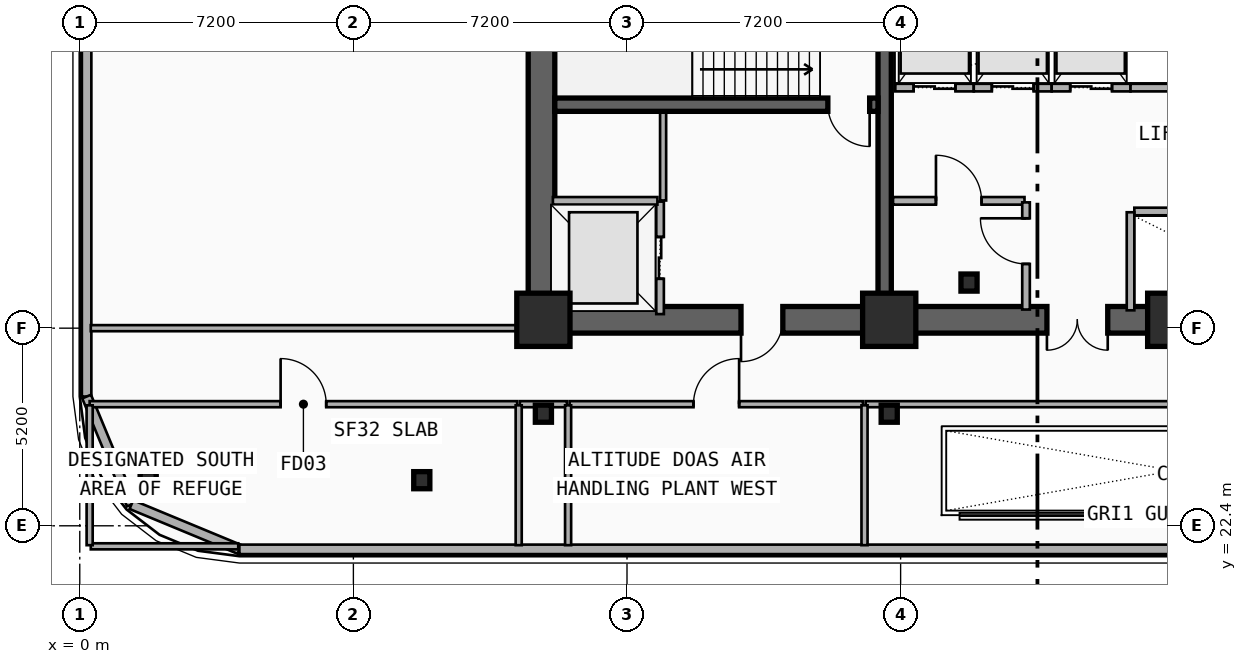
"""IFC4 building model, lengths in metres.
Left out: names, types, materials, properties, quantities, classifications, styles, units other than length and angle.
Written with IfcOpenShell. Run it as: python <this file> out.ifc"""

import sys

from ifc_helpers import new_model, si_unit, direction, frame, frame_2d, origin, origin_2d, place, context, subcontext, project, spatial, rectangle, i_section, extrude, element, fill, save


model = new_model("IFC4")
c1 = context("Model", 3, precision=1e-05, world=origin(), true_north=direction((0.0, 1.0)))
c2 = subcontext(c1, "Body", "Model", "MODEL_VIEW")
j1 = project(units=[si_unit("LENGTHUNIT", "METRE"), si_unit("PLANEANGLEUNIT", "RADIAN")], contexts=[c1])
p1 = place(None, origin())
s1 = spatial("IfcSite", under=j1, at=p1, CompositionType="ELEMENT")
p2 = place(p1, origin())
s2 = spatial("IfcBuilding", under=s1, at=p2, CompositionType="ELEMENT")
p3 = place(p2, frame((0.0, 0.0, 74.5)))
s3 = spatial("IfcBuildingStorey", under=s2, at=p3, CompositionType="ELEMENT", Elevation=74.5)
p4 = place(p3, frame((21.18, 27.82, 0.0), z_axis=(0.0, 0.0, 1.0), x_axis=(-1.0, 0.0, 0.0)))
e1 = element("IfcWall", 1, at=p4, inside=s3, PredefinedType="SHEAR", context=c2, shape_type="SweptSolid", body=[
    extrude(rectangle(XDim=9.03, YDim=0.7, at=frame_2d((4.515, 0.0))), origin(), (0.0, 0.0, 1.0), 4.8),
])
p5 = place(p4, frame((2.68, 0.0, 0.0)))
e2 = element("IfcOpeningElement", 2, at=p5, cuts=e1, PredefinedType="OPENING", context=c2, shape_type="SweptSolid", body=[
    extrude(rectangle(XDim=1.1, YDim=2.15, at=frame_2d((0.55, 1.075))), frame((0.0, 0.36, 0.0), z_axis=(0.0, -1.0, 0.0), x_axis=(1.0, 0.0, 0.0)), (0.0, 0.0, 1.0), 0.72),
])
p6 = place(p3, frame((33.15, 27.82, 0.0), z_axis=(0.0, 0.0, 1.0), x_axis=(-1.0, 0.0, 0.0)))
e3 = element("IfcWall", 3, at=p6, inside=s3, PredefinedType="SHEAR", context=c2, shape_type="SweptSolid", body=[
    extrude(rectangle(XDim=11.97, YDim=0.7, at=frame_2d((5.985, 0.0))), origin(), (0.0, 0.0, 1.0), 4.8),
])
p7 = place(p6, frame((6.1, 0.0, 0.0)))
e4 = element("IfcOpeningElement", 4, at=p7, cuts=e3, PredefinedType="OPENING", context=c2, shape_type="SweptSolid", body=[
    extrude(rectangle(XDim=1.6, YDim=2.2, at=frame_2d((0.8, 1.1))), frame((0.0, 0.36, 0.0), z_axis=(0.0, -1.0, 0.0), x_axis=(1.0, 0.0, 0.0)), (0.0, 0.0, 1.0), 0.72),
])
p8 = place(p3, frame((12.15, 28.17, 0.0), z_axis=(0.0, 0.0, 1.0), x_axis=(0.0, 1.0, 0.0)))
e5 = element("IfcWall", 5, at=p8, inside=s3, PredefinedType="SHEAR", context=c2, shape_type="SweptSolid", body=[
    extrude(rectangle(XDim=8.53, YDim=0.7, at=frame_2d((4.265, 0.0))), origin(), (0.0, 0.0, 1.0), 4.8),
])
p9 = place(p3, frame((21.18, 28.17, 0.0), z_axis=(0.0, 0.0, 1.0), x_axis=(0.0, 1.0, 0.0)))
e6 = element("IfcWall", 6, at=p9, inside=s3, PredefinedType="SHEAR", context=c2, shape_type="SweptSolid", body=[
    extrude(rectangle(XDim=8.53, YDim=0.35, at=frame_2d((4.265, 0.0))), origin(), (0.0, 0.0, 1.0), 4.8),
])
p10 = place(p3, frame((21.005, 33.48, 0.0), z_axis=(0.0, 0.0, 1.0), x_axis=(-1.0, 0.0, 0.0)))
e7 = element("IfcWall", 7, at=p10, inside=s3, PredefinedType="SHEAR", context=c2, shape_type="SweptSolid", body=[
    extrude(rectangle(XDim=8.505, YDim=0.35, at=frame_2d((4.252, 0.0))), origin(), (0.0, 0.0, 1.0), 4.8),
])
p11 = place(p10, frame((0.22, 0.0, 0.0)))
e8 = element("IfcOpeningElement", 8, at=p11, cuts=e7, PredefinedType="OPENING", context=c2, shape_type="SweptSolid", body=[
    extrude(rectangle(XDim=1.1, YDim=2.15, at=frame_2d((0.55, 1.075))), frame((0.0, 0.185, 0.0), z_axis=(0.0, -1.0, 0.0), x_axis=(1.0, 0.0, 0.0)), (0.0, 0.0, 1.0), 0.37),
])
p12 = place(p3, frame((23.4, 28.8, 0.0), z_axis=(0.0, 0.0, 1.0), x_axis=(1.0, 0.0, 0.0)))
e9 = element("IfcColumn", 9, at=p12, inside=s3, PredefinedType="COLUMN", context=c2, shape_type="SweptSolid", body=[
    extrude(i_section(OverallWidth=0.424, OverallDepth=0.45, WebThickness=0.041, FlangeThickness=0.065, FilletRadius=0.015, at=origin_2d()), origin(), (0.0, 0.0, 1.0), 4.8),
])
for number, where, z_axis, x_axis in (
    (10, (12.2, 27.82, 0.0), (0.0, 0.0, 1.0), (1.0, 0.0, 0.0)),
    (11, (21.3, 27.82, 0.0), (0.0, 0.0, 1.0), (1.0, 0.0, 0.0)),
    (12, (28.8, 27.82, 0.0), (0.0, 0.0, 1.0), (1.0, 0.0, 0.0)),
):
    element("IfcColumn", number, at=place(p3, frame(where, z_axis=z_axis, x_axis=x_axis)), inside=s3, PredefinedType="COLUMN", context=c2, shape_type="SweptSolid", body=[
        extrude(rectangle(XDim=1.4, YDim=1.4, at=origin_2d()), origin(), (0.0, 0.0, 1.0), 4.8),
    ])
for number, where, z_axis, x_axis in (
    (13, (12.2, 25.35, 0.0), (0.0, 0.0, 1.0), (1.0, 0.0, 0.0)),
    (14, (21.3, 25.35, 0.0), (0.0, 0.0, 1.0), (1.0, 0.0, 0.0)),
    (15, (9.0, 23.6, 0.0), (0.0, 0.0, 1.0), (1.0, 0.0, 0.0)),
    (16, (1.8, 23.6, 0.0), (0.0, 0.0, 1.0), (1.0, 0.0, 0.0)),
):
    element("IfcColumn", number, at=place(p3, frame(where, z_axis=z_axis, x_axis=x_axis)), inside=s3, PredefinedType="COLUMN", context=c2, shape_type="SweptSolid", body=[
        extrude(i_section(OverallWidth=0.424, OverallDepth=0.45, WebThickness=0.041, FlangeThickness=0.065, FilletRadius=0.015, at=origin_2d()), origin(), (0.0, 0.0, 1.0), 4.8),
    ])
p13 = place(p3, frame((0.18, 25.8, 0.0), z_axis=(0.0, 0.0, 1.0), x_axis=(0.0, 1.0, 0.0)))
e17 = element("IfcWall", 17, at=p13, inside=s3, PredefinedType="SOLIDWALL", context=c2, shape_type="SweptSolid", body=[
    extrude(rectangle(XDim=15.2, YDim=0.25, at=frame_2d((7.6, 0.0))), origin(), (0.0, 0.0, 1.0), 4.48),
])
p14 = place(p3, frame((1.357, 22.958, 0.0), z_axis=(0.0, 0.0, 1.0), x_axis=(-0.382704529509, 0.923870793506, 0.0)))
e18 = element("IfcWall", 18, at=p14, inside=s3, PredefinedType="SOLIDWALL", context=c2, shape_type="SweptSolid", body=[
    extrude(rectangle(XDim=3.077, YDim=0.25, at=frame_2d((1.538, 0.0))), origin(), (0.0, 0.0, 1.0), 4.48),
])
p15 = place(p3, frame((4.2, 21.78, 0.0), z_axis=(0.0, 0.0, 1.0), x_axis=(-0.923870793506, 0.382704529509, 0.0)))
e19 = element("IfcWall", 19, at=p15, inside=s3, PredefinedType="SOLIDWALL", context=c2, shape_type="SweptSolid", body=[
    extrude(rectangle(XDim=3.077, YDim=0.25, at=frame_2d((1.538, 0.0))), origin(), (0.0, 0.0, 1.0), 3.96),
])
p16 = place(p3, frame((53.4, 21.78, 0.0), z_axis=(0.0, 0.0, 1.0), x_axis=(-1.0, 0.0, 0.0)))
e20 = element("IfcWall", 20, at=p16, inside=s3, PredefinedType="SOLIDWALL", context=c2, shape_type="SweptSolid", body=[
    extrude(rectangle(XDim=49.2, YDim=0.25, at=frame_2d((24.6, 0.0))), origin(), (0.0, 0.0, 1.0), 4.07),
])
p17 = place(p3, frame((15.27, 27.97, 0.0), z_axis=(0.0, 0.0, 1.0), x_axis=(0.0, 1.0, 0.0)))
e21 = element("IfcWall", 21, at=p17, inside=s3, PredefinedType="PARTITIONING", context=c2, shape_type="SweptSolid", body=[
    extrude(rectangle(XDim=2.96, YDim=0.2, at=frame_2d((1.48, 0.0))), origin(), (0.0, 0.0, 1.0), 3.452),
])
p18 = place(p17, frame((0.93, 0.0, 0.0)))
e22 = element("IfcOpeningElement", 22, at=p18, cuts=e21, PredefinedType="OPENING", context=c2, shape_type="SweptSolid", body=[
    extrude(rectangle(XDim=1.1, YDim=2.15, at=frame_2d((0.55, 1.075))), frame((0.0, 0.11, 0.0), z_axis=(0.0, -1.0, 0.0), x_axis=(1.0, 0.0, 0.0)), (0.0, 0.0, 1.0), 0.22),
])
p19 = place(p3, frame((12.45, 30.95, 0.0), z_axis=(0.0, 0.0, 1.0), x_axis=(1.0, 0.0, 0.0)))
e23 = element("IfcWall", 23, at=p19, inside=s3, PredefinedType="PARTITIONING", context=c2, shape_type="SweptSolid", body=[
    extrude(rectangle(XDim=2.75, YDim=0.2, at=frame_2d((1.375, 0.0))), origin(), (0.0, 0.0, 1.0), 3.452),
])
p20 = place(p3, frame((27.75, 30.67, 0.0), z_axis=(0.0, 0.0, 1.0), x_axis=(1.0, 0.0, 0.0)))
e24 = element("IfcWall", 24, at=p20, inside=s3, PredefinedType="PARTITIONING", context=c2, shape_type="SweptSolid", body=[
    extrude(rectangle(XDim=1.975, YDim=0.2, at=frame_2d((0.988, 0.0))), origin(), (0.0, 0.0, 1.0), 3.452),
])
p21 = place(p3, frame((27.65, 28.07, 0.0), z_axis=(0.0, 0.0, 1.0), x_axis=(0.0, 1.0, 0.0)))
e25 = element("IfcWall", 25, at=p21, inside=s3, PredefinedType="PARTITIONING", context=c2, shape_type="SweptSolid", body=[
    extrude(rectangle(XDim=2.58, YDim=0.2, at=frame_2d((1.29, 0.0))), origin(), (0.0, 0.0, 1.0), 3.452),
])
p22 = place(p3, frame((21.46, 33.93, 0.0), z_axis=(0.0, 0.0, 1.0), x_axis=(1.0, 0.0, 0.0)))
e26 = element("IfcWall", 26, at=p22, inside=s3, PredefinedType="PARTITIONING", context=c2, shape_type="SweptSolid", body=[
    extrude(rectangle(XDim=2.065, YDim=0.2, at=frame_2d((1.032, 0.0))), origin(), (0.0, 0.0, 1.0), 3.452),
])
p23 = place(p22, frame((0.482, 0.0, 0.0)))
e27 = element("IfcOpeningElement", 27, at=p23, cuts=e26, PredefinedType="OPENING", context=c2, shape_type="SweptSolid", body=[
    extrude(rectangle(XDim=1.1, YDim=2.15, at=frame_2d((0.55, 1.075))), frame((0.0, 0.11, 0.0), z_axis=(0.0, -1.0, 0.0), x_axis=(1.0, 0.0, 0.0)), (0.0, 0.0, 1.0), 0.22),
])
p24 = place(p3, frame((23.525, 33.93, 0.0), z_axis=(0.0, 0.0, 1.0), x_axis=(1.0, 0.0, 0.0)))
e28 = element("IfcWall", 28, at=p24, inside=s3, PredefinedType="PARTITIONING", context=c2, shape_type="SweptSolid", body=[
    extrude(rectangle(XDim=2.05, YDim=0.2, at=frame_2d((1.025, 0.0))), origin(), (0.0, 0.0, 1.0), 4.48),
])
p25 = place(p24, frame((0.475, 0.0, 0.0)))
e29 = element("IfcOpeningElement", 29, at=p25, cuts=e28, PredefinedType="OPENING", context=c2, shape_type="SweptSolid", body=[
    extrude(rectangle(XDim=1.1, YDim=2.15, at=frame_2d((0.55, 1.075))), frame((0.0, 0.11, 0.0), z_axis=(0.0, -1.0, 0.0), x_axis=(1.0, 0.0, 0.0)), (0.0, 0.0, 1.0), 0.22),
])
p26 = place(p3, frame((25.575, 33.93, 0.0), z_axis=(0.0, 0.0, 1.0), x_axis=(1.0, 0.0, 0.0)))
e30 = element("IfcWall", 30, at=p26, inside=s3, PredefinedType="PARTITIONING", context=c2, shape_type="SweptSolid", body=[
    extrude(rectangle(XDim=2.075, YDim=0.2, at=frame_2d((1.038, 0.0))), origin(), (0.0, 0.0, 1.0), 4.48),
])
p27 = place(p26, frame((0.488, 0.0, 0.0)))
e31 = element("IfcOpeningElement", 31, at=p27, cuts=e30, PredefinedType="OPENING", context=c2, shape_type="SweptSolid", body=[
    extrude(rectangle(XDim=1.1, YDim=2.15, at=frame_2d((0.55, 1.075))), frame((0.0, 0.11, 0.0), z_axis=(0.0, -1.0, 0.0), x_axis=(1.0, 0.0, 0.0)), (0.0, 0.0, 1.0), 0.22),
])
p28 = place(p3, frame((27.65, 33.93, 0.0), z_axis=(0.0, 0.0, 1.0), x_axis=(1.0, 0.0, 0.0)))
e32 = element("IfcWall", 32, at=p28, inside=s3, PredefinedType="PARTITIONING", context=c2, shape_type="SweptSolid", body=[
    extrude(rectangle(XDim=2.075, YDim=0.2, at=frame_2d((1.038, 0.0))), origin(), (0.0, 0.0, 1.0), 3.452),
])
p29 = place(p3, frame((21.4, 30.95, 0.0), z_axis=(0.0, 0.0, 1.0), x_axis=(1.0, 0.0, 0.0)))
e33 = element("IfcWall", 33, at=p29, inside=s3, PredefinedType="PARTITIONING", context=c2, shape_type="SweptSolid", body=[
    extrude(rectangle(XDim=3.46, YDim=0.2, at=frame_2d((1.73, 0.0))), origin(), (0.0, 0.0, 1.0), 3.452),
])
p30 = place(p29, frame((1.13, 0.0, 0.0)))
e34 = element("IfcOpeningElement", 34, at=p30, cuts=e33, PredefinedType="OPENING", context=c2, shape_type="SweptSolid", body=[
    extrude(rectangle(XDim=1.2, YDim=2.15, at=frame_2d((0.6, 1.075))), frame((0.0, 0.11, 0.0), z_axis=(0.0, -1.0, 0.0), x_axis=(1.0, 0.0, 0.0)), (0.0, 0.0, 1.0), 0.22),
])
p31 = place(p3, frame((24.9, 28.09, 0.0), z_axis=(0.0, 0.0, 1.0), x_axis=(0.0, 1.0, 0.0)))
e35 = element("IfcWall", 35, at=p31, inside=s3, PredefinedType="PARTITIONING", context=c2, shape_type="SweptSolid", body=[
    extrude(rectangle(XDim=2.82, YDim=0.2, at=frame_2d((1.41, 0.0))), origin(), (0.0, 0.0, 1.0), 3.86),
])
p32 = place(p31, frame((1.201, 0.0, 0.0)))
e36 = element("IfcOpeningElement", 36, at=p32, cuts=e35, PredefinedType="OPENING", context=c2, shape_type="SweptSolid", body=[
    extrude(rectangle(XDim=1.2, YDim=2.15, at=frame_2d((0.6, 1.075))), frame((0.0, 0.11, 0.0), z_axis=(0.0, -1.0, 0.0), x_axis=(1.0, 0.0, 0.0)), (0.0, 0.0, 1.0), 0.22),
])
p33 = place(p3, frame((0.26, 25.6, 0.0), z_axis=(0.0, 0.0, 1.0), x_axis=(1.0, 0.0, 0.0)))
e37 = element("IfcWall", 37, at=p33, inside=s3, PredefinedType="PARTITIONING", context=c2, shape_type="SweptSolid", body=[
    extrude(rectangle(XDim=11.25, YDim=0.16, at=frame_2d((5.625, 0.0))), origin(), (0.0, 0.0, 1.0), 3.81),
])
p34 = place(p33, frame((5.025, 0.0, 0.0)))
e38 = element("IfcOpeningElement", 38, at=p34, cuts=e37, PredefinedType="OPENING", context=c2, shape_type="SweptSolid", body=[
    extrude(rectangle(XDim=1.2, YDim=2.15, at=frame_2d((0.6, 1.075))), frame((0.0, 0.09, 0.0), z_axis=(0.0, -1.0, 0.0), x_axis=(1.0, 0.0, 0.0)), (0.0, 0.0, 1.0), 0.18),
])
p35 = place(p3, frame((12.89, 25.6, 0.0), z_axis=(0.0, 0.0, 1.0), x_axis=(1.0, 0.0, 0.0)))
e39 = element("IfcWall", 39, at=p35, inside=s3, PredefinedType="PARTITIONING", context=c2, shape_type="SweptSolid", body=[
    extrude(rectangle(XDim=7.72, YDim=0.16, at=frame_2d((3.86, 0.0))), origin(), (0.0, 0.0, 1.0), 4.48),
])
p36 = place(p35, frame((3.26, 0.0, 0.0)))
e40 = element("IfcOpeningElement", 40, at=p36, cuts=e39, PredefinedType="OPENING", context=c2, shape_type="SweptSolid", body=[
    extrude(rectangle(XDim=1.2, YDim=2.15, at=frame_2d((0.6, 1.075))), frame((0.0, 0.09, 0.0), z_axis=(0.0, -1.0, 0.0), x_axis=(1.0, 0.0, 0.0)), (0.0, 0.0, 1.0), 0.18),
])
p37 = place(p3, frame((15.35, 30.96, 0.0), z_axis=(0.0, 0.0, 1.0), x_axis=(0.0, 1.0, 0.0)))
e41 = element("IfcWall", 41, at=p37, inside=s3, PredefinedType="PARTITIONING", context=c2, shape_type="SweptSolid", body=[
    extrude(rectangle(XDim=2.31, YDim=0.16, at=frame_2d((1.155, 0.0))), origin(), (0.0, 0.0, 1.0), 4.48),
])
p38 = place(p3, frame((11.58, 25.6, 0.0), z_axis=(0.0, 0.0, 1.0), x_axis=(1.0, 0.0, 0.0)))
e42 = element("IfcWall", 42, at=p38, inside=s3, PredefinedType="PARTITIONING", context=c2, shape_type="SweptSolid", body=[
    extrude(rectangle(XDim=1.24, YDim=0.16, at=frame_2d((0.62, 0.0))), origin(), (0.0, 0.0, 1.0), 3.55),
])
p39 = place(p3, frame((20.68, 25.6, 0.0), z_axis=(0.0, 0.0, 1.0), x_axis=(1.0, 0.0, 0.0)))
e43 = element("IfcWall", 43, at=p39, inside=s3, PredefinedType="PARTITIONING", context=c2, shape_type="SweptSolid", body=[
    extrude(rectangle(XDim=16.29, YDim=0.16, at=frame_2d((8.145, 0.0))), origin(), (0.0, 0.0, 1.0), 3.55),
])
p40 = place(p3, frame((0.29, 27.6, 0.0), z_axis=(0.0, 0.0, 1.0), x_axis=(1.0, 0.0, 0.0)))
e44 = element("IfcWall", 44, at=p40, inside=s3, PredefinedType="PARTITIONING", context=c2, shape_type="SweptSolid", body=[
    extrude(rectangle(XDim=11.83, YDim=0.16, at=frame_2d((5.915, 0.0))), origin(), (0.0, 0.0, 1.0), 3.452),
])
p41 = place(p3, frame((0.29, 21.86, 0.0), z_axis=(0.0, 0.0, 1.0), x_axis=(1.0, 0.0, 0.0)))
e45 = element("IfcWall", 45, at=p41, inside=s3, PredefinedType="PARTITIONING", context=c2, shape_type="SweptSolid", body=[
    extrude(rectangle(XDim=3.88, YDim=0.16, at=frame_2d((1.94, 0.0))), origin(), (0.0, 0.0, 1.0), 3.96),
])
p42 = place(p3, frame((0.26, 21.89, 0.0), z_axis=(0.0, 0.0, 1.0), x_axis=(0.0, 1.0, 0.0)))
e46 = element("IfcWall", 46, at=p42, inside=s3, PredefinedType="PARTITIONING", context=c2, shape_type="SweptSolid", body=[
    extrude(rectangle(XDim=3.68, YDim=0.16, at=frame_2d((1.84, 0.0))), origin(), (0.0, 0.0, 1.0), 4.48),
])
p43 = place(p3, frame((11.55, 21.89, 0.0), z_axis=(0.0, 0.0, 1.0), x_axis=(0.0, 1.0, 0.0)))
e47 = element("IfcWall", 47, at=p43, inside=s3, PredefinedType="PARTITIONING", context=c2, shape_type="SweptSolid", body=[
    extrude(rectangle(XDim=3.68, YDim=0.16, at=frame_2d((1.84, 0.0))), origin(), (0.0, 0.0, 1.0), 3.96),
])
for number, where, z_axis, x_axis in (
    (48, (12.85, 21.89, 0.0), (0.0, 0.0, 1.0), (0.0, 1.0, 0.0)),
    (49, (20.65, 21.89, 0.0), (0.0, 0.0, 1.0), (0.0, 1.0, 0.0)),
):
    element("IfcWall", number, at=place(p3, frame(where, z_axis=z_axis, x_axis=x_axis)), inside=s3, PredefinedType="PARTITIONING", context=c2, shape_type="SweptSolid", body=[
        extrude(rectangle(XDim=3.68, YDim=0.16, at=frame_2d((1.84, 0.0))), origin(), (0.0, 0.0, 1.0), 3.91),
    ])
p44 = place(p18, origin())
e50 = element("IfcDoor", 50, at=p44, inside=s3, OperationType="DOUBLE_DOOR_SLIDING", PredefinedType="DOOR", context=c2, shape_type="SweptSolid", body=[
    extrude(rectangle(XDim=1.1, YDim=2.15, at=frame_2d((0.55, 1.075))), frame((0.0, 0.025, 0.0), z_axis=(0.0, -1.0, 0.0), x_axis=(1.0, 0.0, 0.0)), (0.0, 0.0, 1.0), 0.05),
])
fill(e22, e50)
p45 = place(p23, origin())
e51 = element("IfcDoor", 51, at=p45, inside=s3, OperationType="DOUBLE_DOOR_SLIDING", PredefinedType="DOOR", context=c2, shape_type="SweptSolid", body=[
    extrude(rectangle(XDim=1.1, YDim=2.15, at=frame_2d((0.55, 1.075))), frame((0.0, 0.025, 0.0), z_axis=(0.0, -1.0, 0.0), x_axis=(1.0, 0.0, 0.0)), (0.0, 0.0, 1.0), 0.05),
])
fill(e27, e51)
p46 = place(p25, origin())
e52 = element("IfcDoor", 52, at=p46, inside=s3, OperationType="DOUBLE_DOOR_SLIDING", PredefinedType="DOOR", context=c2, shape_type="SweptSolid", body=[
    extrude(rectangle(XDim=1.1, YDim=2.15, at=frame_2d((0.55, 1.075))), frame((0.0, 0.025, 0.0), z_axis=(0.0, -1.0, 0.0), x_axis=(1.0, 0.0, 0.0)), (0.0, 0.0, 1.0), 0.05),
])
fill(e29, e52)
p47 = place(p27, origin())
e53 = element("IfcDoor", 53, at=p47, inside=s3, OperationType="DOUBLE_DOOR_SLIDING", PredefinedType="DOOR", context=c2, shape_type="SweptSolid", body=[
    extrude(rectangle(XDim=1.1, YDim=2.15, at=frame_2d((0.55, 1.075))), frame((0.0, 0.025, 0.0), z_axis=(0.0, -1.0, 0.0), x_axis=(1.0, 0.0, 0.0)), (0.0, 0.0, 1.0), 0.05),
])
fill(e31, e53)
p48 = place(p11, origin())
e54 = element("IfcDoor", 54, at=p48, inside=s3, OperationType="SINGLE_SWING_LEFT", PredefinedType="DOOR", context=c2, shape_type="SweptSolid", body=[
    extrude(rectangle(XDim=1.1, YDim=2.15, at=frame_2d((0.55, 1.075))), frame((0.0, 0.025, 0.0), z_axis=(0.0, -1.0, 0.0), x_axis=(1.0, 0.0, 0.0)), (0.0, 0.0, 1.0), 0.05),
])
fill(e8, e54)
p49 = place(p5, origin())
e55 = element("IfcDoor", 55, at=p49, inside=s3, OperationType="SINGLE_SWING_RIGHT", PredefinedType="DOOR", context=c2, shape_type="SweptSolid", body=[
    extrude(rectangle(XDim=1.1, YDim=2.15, at=frame_2d((0.55, 1.075))), frame((0.0, 0.025, 0.0), z_axis=(0.0, -1.0, 0.0), x_axis=(1.0, 0.0, 0.0)), (0.0, 0.0, 1.0), 0.05),
])
fill(e2, e55)
p50 = place(p7, origin())
e56 = element("IfcDoor", 56, at=p50, inside=s3, OperationType="SINGLE_SWING_LEFT", PredefinedType="DOOR", context=c2, shape_type="SweptSolid", body=[
    extrude(rectangle(XDim=1.6, YDim=2.2, at=frame_2d((0.8, 1.1))), frame((0.0, 0.025, 0.0), z_axis=(0.0, -1.0, 0.0), x_axis=(1.0, 0.0, 0.0)), (0.0, 0.0, 1.0), 0.05),
])
fill(e4, e56)
p51 = place(p30, origin())
e57 = element("IfcDoor", 57, at=p51, inside=s3, OperationType="SINGLE_SWING_LEFT", PredefinedType="DOOR", context=c2, shape_type="SweptSolid", body=[
    extrude(rectangle(XDim=1.2, YDim=2.15, at=frame_2d((0.6, 1.075))), frame((0.0, 0.025, 0.0), z_axis=(0.0, -1.0, 0.0), x_axis=(1.0, 0.0, 0.0)), (0.0, 0.0, 1.0), 0.05),
])
fill(e34, e57)
p52 = place(p32, origin())
e58 = element("IfcDoor", 58, at=p52, inside=s3, OperationType="SINGLE_SWING_RIGHT", PredefinedType="DOOR", context=c2, shape_type="SweptSolid", body=[
    extrude(rectangle(XDim=1.2, YDim=2.15, at=frame_2d((0.6, 1.075))), frame((0.0, 0.025, 0.0), z_axis=(0.0, -1.0, 0.0), x_axis=(1.0, 0.0, 0.0)), (0.0, 0.0, 1.0), 0.05),
])
fill(e36, e58)
p53 = place(p34, origin())
e59 = element("IfcDoor", 59, at=p53, inside=s3, OperationType="SINGLE_SWING_LEFT", PredefinedType="DOOR", context=c2, shape_type="SweptSolid", body=[
    extrude(rectangle(XDim=1.2, YDim=2.15, at=frame_2d((0.6, 1.075))), frame((0.0, 0.025, 0.0), z_axis=(0.0, -1.0, 0.0), x_axis=(1.0, 0.0, 0.0)), (0.0, 0.0, 1.0), 0.05),
])
fill(e38, e59)
p54 = place(p36, origin())
e60 = element("IfcDoor", 60, at=p54, inside=s3, OperationType="SINGLE_SWING_RIGHT", PredefinedType="DOOR", context=c2, shape_type="SweptSolid", body=[
    extrude(rectangle(XDim=1.2, YDim=2.15, at=frame_2d((0.6, 1.075))), frame((0.0, 0.025, 0.0), z_axis=(0.0, -1.0, 0.0), x_axis=(1.0, 0.0, 0.0)), (0.0, 0.0, 1.0), 0.05),
])
fill(e40, e60)
save(model, sys.argv[1])
